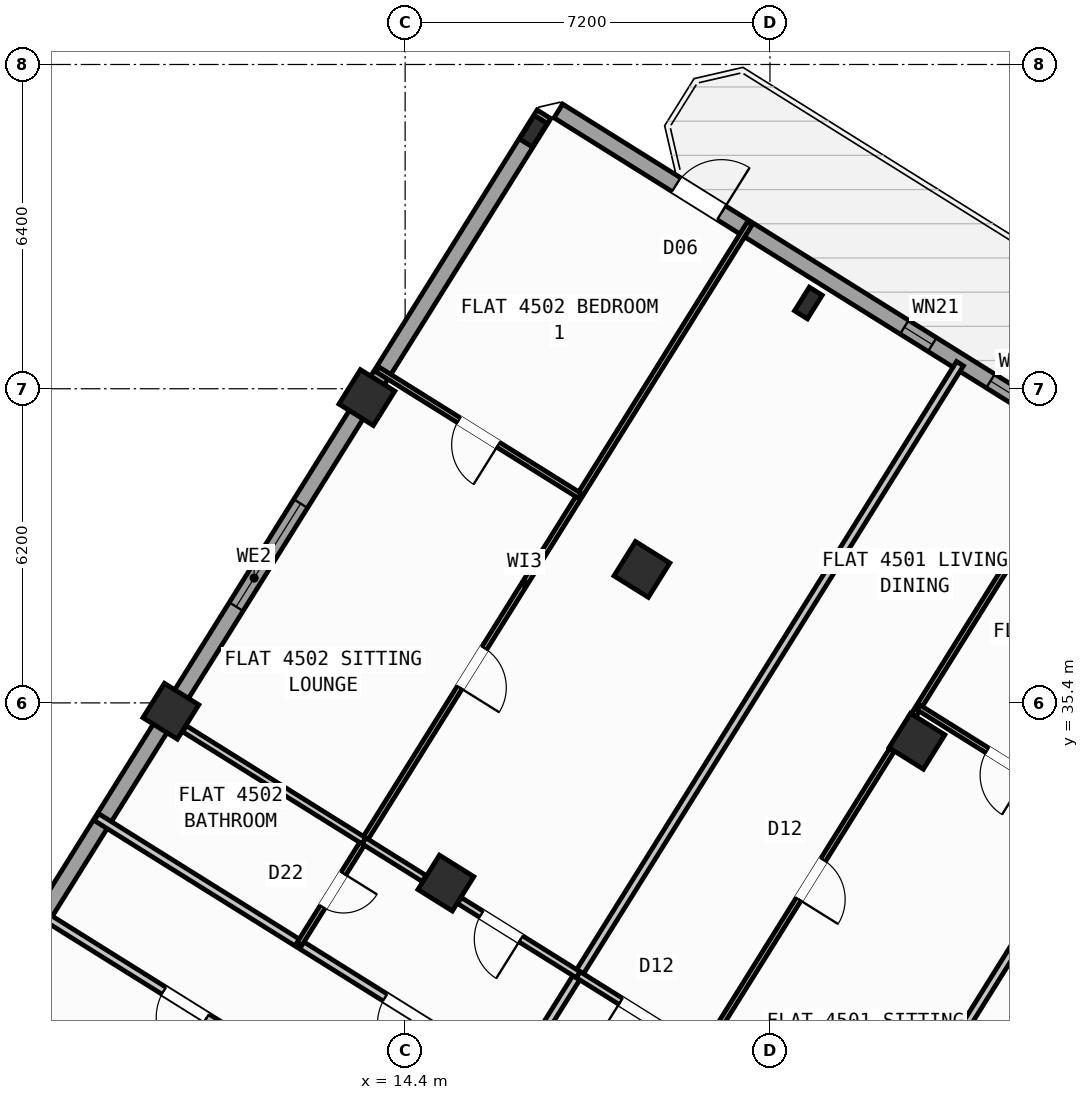
"""IFC4 building model, lengths in metres.
Left out: names, types, materials, properties, quantities, classifications, styles, units other than length and angle.
Written with IfcOpenShell. Run it as: python <this file> out.ifc"""

import sys

from ifc_helpers import new_model, si_unit, direction, frame, frame_2d, origin, origin_2d, place, context, subcontext, project, spatial, rectangle, hollow_rectangle, i_section, extrude, source, transform, mapped, element, fill, save


model = new_model("IFC4")
c1 = context("Model", 3, precision=1e-05, world=origin(), true_north=direction((0.0, 1.0)))
c2 = subcontext(c1, "Body", "Model", "MODEL_VIEW")
j1 = project(units=[si_unit("LENGTHUNIT", "METRE"), si_unit("PLANEANGLEUNIT", "RADIAN")], contexts=[c1])
p1 = place(None, origin())
s1 = spatial("IfcSite", under=j1, at=p1, CompositionType="ELEMENT")
p2 = place(p1, origin())
s2 = spatial("IfcBuilding", under=s1, at=p2, CompositionType="ELEMENT")
p3 = place(p2, frame((0.0, 0.0, 179.4)))
s3 = spatial("IfcBuildingStorey", under=s2, at=p3, CompositionType="ELEMENT", Elevation=179.4)
m1 = source(origin(), c2, "Body", "SweptSolid", [
    extrude(hollow_rectangle(XDim=0.8, YDim=0.8, WallThickness=0.032, at=origin_2d()), origin(), (0.0, 0.0, 1.0), 4.8),
])
p4 = place(p3, frame((24.5, 34.643, 0.0), z_axis=(0.0, 0.0, 1.0), x_axis=(-0.848048096156, 0.529919264233, 0.0)))
e1 = element("IfcColumn", 1, at=p4, inside=s3, PredefinedType="COLUMN", context=c2, shape_type="MappedRepresentation", body=[
    mapped(m1, transform((0.0, 0.0, 0.0), scale=1.0)),
])
m2 = source(origin(), c2, "Body", "SweptSolid", [
    extrude(i_section(OverallWidth=0.3, OverallDepth=0.55, WebThickness=0.015, FlangeThickness=0.029, at=origin_2d()), origin(), (0.0, 0.0, 1.0), 4.8),
])
p5 = place(p3, frame((22.358, 43.292, 0.0), z_axis=(0.0, 0.0, 1.0), x_axis=(-0.848048096156, 0.529919264233, 0.0)))
e2 = element("IfcColumn", 2, at=p5, inside=s3, PredefinedType="COLUMN", context=c2, shape_type="MappedRepresentation", body=[
    mapped(m2, transform((0.0, 0.0, 0.0), scale=1.0)),
])
for number, where, z_axis, x_axis in (
    (3, (19.073, 38.034, 0.0), (0.0, 0.0, 1.0), (-0.848, 0.53, 0.0)),
    (4, (15.205, 31.844, 0.0), (0.0, 0.0, 1.0), (-0.848, 0.53, 0.0)),
):
    element("IfcColumn", number, at=place(p3, frame(where, z_axis=z_axis, x_axis=x_axis)), inside=s3, PredefinedType="COLUMN", context=c2, shape_type="MappedRepresentation", body=[
        mapped(m1, transform((0.0, 0.0, 0.0), scale=1.0)),
    ])
p6 = place(p3, frame((16.931, 46.684, 0.0), z_axis=(0.0, 0.0, 1.0), x_axis=(-0.848048096156, 0.529919264233, 0.0)))
e5 = element("IfcColumn", 5, at=p6, inside=s3, PredefinedType="COLUMN", context=c2, shape_type="MappedRepresentation", body=[
    mapped(m2, transform((0.0, 0.0, 0.0), scale=1.0)),
])
for number, where, z_axis, x_axis in (
    (6, (13.646, 41.426, 0.0), (0.0, 0.0, 1.0), (-0.848, 0.53, 0.0)),
    (7, (9.777, 35.235, 0.0), (0.0, 0.0, 1.0), (-0.848, 0.53, 0.0)),
):
    element("IfcColumn", number, at=place(p3, frame(where, z_axis=z_axis, x_axis=x_axis)), inside=s3, PredefinedType="COLUMN", context=c2, shape_type="MappedRepresentation", body=[
        mapped(m1, transform((0.0, 0.0, 0.0), scale=1.0)),
    ])
p7 = place(p3, frame((5.7, 28.71, 0.0), z_axis=(0.0, 0.0, 1.0), x_axis=(0.529923711467, 0.8480453172, 0.0)))
e8 = element("IfcWall", 8, at=p7, inside=s3, PredefinedType="STANDARD", context=c2, shape_type="SweptSolid", body=[
    extrude(rectangle(XDim=21.587, YDim=0.32, at=frame_2d((10.794, 0.0))), origin(), (0.0, 0.0, 1.0), 4.025),
])
p8 = place(p7, frame((10.127, 0.0, 0.75)))
e9 = element("IfcOpeningElement", 9, at=p8, cuts=e8, PredefinedType="OPENING", context=c2, shape_type="SweptSolid", body=[
    extrude(rectangle(XDim=2.4, YDim=1.6, at=frame_2d((1.2, 0.8))), frame((0.0, 0.17, 0.0), z_axis=(0.0, -1.0, 0.0), x_axis=(1.0, 0.0, 0.0)), (0.0, 0.0, 1.0), 0.34),
])
p9 = place(p3, frame((17.424, 47.083, 0.0), z_axis=(0.0, 0.0, 1.0), x_axis=(0.848049927979, -0.529916332693, 0.0)))
e10 = element("IfcWall", 10, at=p9, inside=s3, PredefinedType="STANDARD", context=c2, shape_type="SweptSolid", body=[
    extrude(rectangle(XDim=29.223, YDim=0.32, at=frame_2d((14.612, 0.0))), origin(), (0.0, 0.0, 1.0), 4.55),
])
p10 = place(p9, frame((2.745, 0.0, 0.0)))
e11 = element("IfcOpeningElement", 11, at=p10, cuts=e10, PredefinedType="OPENING", context=c2, shape_type="SweptSolid", body=[
    extrude(rectangle(XDim=1.05, YDim=2.15, at=frame_2d((0.525, 1.075))), frame((0.0, 0.17, 0.0), z_axis=(0.0, -1.0, 0.0), x_axis=(1.0, 0.0, 0.0)), (0.0, 0.0, 1.0), 0.34),
])
p11 = place(p9, frame((21.926, 0.0, 0.75)))
e12 = element("IfcOpeningElement", 12, at=p11, cuts=e10, PredefinedType="OPENING", context=c2, shape_type="SweptSolid", body=[
    extrude(rectangle(XDim=2.4, YDim=1.6, at=frame_2d((1.2, 0.8))), frame((0.0, 0.17, 0.0), z_axis=(0.0, -1.0, 0.0), x_axis=(1.0, 0.0, 0.0)), (0.0, 0.0, 1.0), 0.34),
])
p12 = place(p9, frame((26.934, 0.0, 0.95)))
e13 = element("IfcOpeningElement", 13, at=p12, cuts=e10, PredefinedType="OPENING", context=c2, shape_type="SweptSolid", body=[
    extrude(rectangle(XDim=1.2, YDim=1.4, at=frame_2d((0.6, 0.7))), frame((0.0, 0.17, 0.0), z_axis=(0.0, -1.0, 0.0), x_axis=(1.0, 0.0, 0.0)), (0.0, 0.0, 1.0), 0.34),
])
p13 = place(p9, frame((10.057, 0.0, 1.0)))
e14 = element("IfcOpeningElement", 14, at=p13, cuts=e10, PredefinedType="OPENING", context=c2, shape_type="SweptSolid", body=[
    extrude(rectangle(XDim=0.65, YDim=1.15, at=frame_2d((0.325, 0.575))), frame((0.0, 0.17, 0.0), z_axis=(0.0, -1.0, 0.0), x_axis=(1.0, 0.0, 0.0)), (0.0, 0.0, 1.0), 0.34),
])
p14 = place(p9, frame((14.636, 0.0, 1.0)))
e15 = element("IfcOpeningElement", 15, at=p14, cuts=e10, PredefinedType="OPENING", context=c2, shape_type="SweptSolid", body=[
    extrude(rectangle(XDim=0.9, YDim=1.25, at=frame_2d((0.45, 0.625))), frame((0.0, 0.17, 0.0), z_axis=(0.0, -1.0, 0.0), x_axis=(1.0, 0.0, 0.0)), (0.0, 0.0, 1.0), 0.34),
])
p15 = place(p9, frame((8.052, 0.0, 1.0)))
e16 = element("IfcOpeningElement", 16, at=p15, cuts=e10, PredefinedType="OPENING", context=c2, shape_type="SweptSolid", body=[
    extrude(rectangle(XDim=0.65, YDim=1.15, at=frame_2d((0.325, 0.575))), frame((0.0, 0.17, 0.0), z_axis=(0.0, -1.0, 0.0), x_axis=(1.0, 0.0, 0.0)), (0.0, 0.0, 1.0), 0.34),
])
p16 = place(p3, frame((31.239, 38.274, 0.0), z_axis=(0.0, 0.0, 1.0), x_axis=(-0.529921796515, -0.848046513806, 0.0)))
e17 = element("IfcWall", 17, at=p16, inside=s3, PredefinedType="PARTITIONING", context=c2, shape_type="SweptSolid", body=[
    extrude(rectangle(XDim=16.5, YDim=0.16, at=frame_2d((8.25, 0.0))), origin(), (0.0, 0.0, 1.0), 4.54),
])
p17 = place(p3, frame((22.495, 24.281, 0.0), z_axis=(0.0, 0.0, 1.0), x_axis=(-0.848052408131, 0.529912363569, 0.0)))
e18 = element("IfcWall", 18, at=p17, inside=s3, PredefinedType="PARTITIONING", context=c2, shape_type="SweptSolid", body=[
    extrude(rectangle(XDim=16.73, YDim=0.16, at=frame_2d((8.365, 0.0))), origin(), (0.0, 0.0, 1.0), 4.54),
])
p18 = place(p17, frame((5.068, 0.0, 0.0)))
e19 = element("IfcOpeningElement", 19, at=p18, cuts=e18, PredefinedType="OPENING", context=c2, shape_type="SweptSolid", body=[
    extrude(rectangle(XDim=1.0, YDim=2.1, at=frame_2d((0.5, 1.05))), frame((0.0, 0.09, 0.0), z_axis=(0.0, -1.0, 0.0), x_axis=(1.0, 0.0, 0.0)), (0.0, 0.0, 1.0), 0.18),
])
p19 = place(p17, frame((9.011, 0.0, 0.0)))
e20 = element("IfcOpeningElement", 20, at=p19, cuts=e18, PredefinedType="OPENING", context=c2, shape_type="SweptSolid", body=[
    extrude(rectangle(XDim=1.0, YDim=2.1, at=frame_2d((0.5, 1.05))), frame((0.0, 0.09, 0.0), z_axis=(0.0, -1.0, 0.0), x_axis=(1.0, 0.0, 0.0)), (0.0, 0.0, 1.0), 0.18),
])
p20 = place(p3, frame((21.329, 22.416, 0.0), z_axis=(0.0, 0.0, 1.0), x_axis=(-0.848052408131, 0.529912363569, 0.0)))
e21 = element("IfcWall", 21, at=p20, inside=s3, PredefinedType="PARTITIONING", context=c2, shape_type="SweptSolid", body=[
    extrude(rectangle(XDim=16.73, YDim=0.16, at=frame_2d((8.365, 0.0))), origin(), (0.0, 0.0, 1.0), 4.54),
])
p21 = place(p20, frame((1.505, 0.0, 0.0)))
e22 = element("IfcOpeningElement", 22, at=p21, cuts=e21, PredefinedType="OPENING", context=c2, shape_type="SweptSolid", body=[
    extrude(rectangle(XDim=1.0, YDim=2.1, at=frame_2d((0.5, 1.05))), frame((0.0, 0.09, 0.0), z_axis=(0.0, -1.0, 0.0), x_axis=(1.0, 0.0, 0.0)), (0.0, 0.0, 1.0), 0.18),
])
p22 = place(p20, frame((6.435, 0.0, 0.0)))
e23 = element("IfcOpeningElement", 23, at=p22, cuts=e21, PredefinedType="OPENING", context=c2, shape_type="SweptSolid", body=[
    extrude(rectangle(XDim=1.0, YDim=2.1, at=frame_2d((0.5, 1.05))), frame((0.0, 0.09, 0.0), z_axis=(0.0, -1.0, 0.0), x_axis=(1.0, 0.0, 0.0)), (0.0, 0.0, 1.0), 0.18),
])
p23 = place(p20, frame((12.784, 0.0, 0.0)))
e24 = element("IfcOpeningElement", 24, at=p23, cuts=e21, PredefinedType="OPENING", context=c2, shape_type="SweptSolid", body=[
    extrude(rectangle(XDim=1.0, YDim=2.1, at=frame_2d((0.5, 1.05))), frame((0.0, 0.09, 0.0), z_axis=(0.0, -1.0, 0.0), x_axis=(1.0, 0.0, 0.0)), (0.0, 0.0, 1.0), 0.18),
])
p24 = place(p3, frame((25.351, 42.095, 0.0), z_axis=(0.0, 0.0, 1.0), x_axis=(-0.529926315456, -0.848043690023, 0.0)))
e25 = element("IfcWall", 25, at=p24, inside=s3, PredefinedType="PARTITIONING", context=c2, shape_type="SweptSolid", body=[
    extrude(rectangle(XDim=16.62, YDim=0.16, at=frame_2d((8.31, 0.0))), origin(), (0.0, 0.0, 1.0), 4.54),
])
p25 = place(p3, frame((27.889, 40.685, 0.0), z_axis=(0.0, 0.0, 1.0), x_axis=(-0.529924752708, -0.848044666552, 0.0)))
e26 = element("IfcWall", 26, at=p25, inside=s3, PredefinedType="PARTITIONING", context=c2, shape_type="SweptSolid", body=[
    extrude(rectangle(XDim=6.508, YDim=0.11, at=frame_2d((3.254, 0.0))), origin(), (0.0, 0.0, 1.0), 4.54),
])
p26 = place(p3, frame((24.004, 34.467, 0.0), z_axis=(0.0, 0.0, 1.0), x_axis=(-0.529907440938, -0.848055484057, 0.0)))
e27 = element("IfcWall", 27, at=p26, inside=s3, PredefinedType="PARTITIONING", context=c2, shape_type="SweptSolid", body=[
    extrude(rectangle(XDim=6.476, YDim=0.11, at=frame_2d((3.238, 0.0))), origin(), (0.0, 0.0, 1.0), 4.54),
])
p27 = place(p26, frame((2.552, 0.0, 0.0)))
e28 = element("IfcOpeningElement", 28, at=p27, cuts=e27, PredefinedType="OPENING", context=c2, shape_type="SweptSolid", body=[
    extrude(rectangle(XDim=0.92, YDim=2.08, at=frame_2d((0.46, 1.04))), frame((0.0, 0.065, 0.0), z_axis=(0.0, -1.0, 0.0), x_axis=(1.0, 0.0, 0.0)), (0.0, 0.0, 1.0), 0.13),
])
p28 = place(p3, frame((20.203, 28.543, 0.0), z_axis=(0.0, 0.0, 1.0), x_axis=(-0.848066485351, 0.529889834233, 0.0)))
e29 = element("IfcWall", 29, at=p28, inside=s3, PredefinedType="PLUMBINGWALL", context=c2, shape_type="SweptSolid", body=[
    extrude(rectangle(XDim=2.816, YDim=0.14, at=frame_2d((1.408, 0.0))), origin(), (0.0, 0.0, 1.0), 4.025),
])
p29 = place(p28, frame((0.906, 0.0, 0.0)))
e30 = element("IfcOpeningElement", 30, at=p29, cuts=e29, PredefinedType="OPENING", context=c2, shape_type="SweptSolid", body=[
    extrude(rectangle(XDim=0.92, YDim=2.08, at=frame_2d((0.46, 1.04))), frame((0.0, 0.08, 0.0), z_axis=(0.0, -1.0, 0.0), x_axis=(1.0, 0.0, 0.0)), (0.0, 0.0, 1.0), 0.16),
])
p30 = place(p3, frame((28.023, 33.129, 0.0), z_axis=(0.0, 0.0, 1.0), x_axis=(-0.848051592054, 0.529913669587, 0.0)))
e31 = element("IfcWall", 31, at=p30, inside=s3, PredefinedType="PARTITIONING", context=c2, shape_type="SweptSolid", body=[
    extrude(rectangle(XDim=4.118, YDim=0.11, at=frame_2d((2.059, 0.0))), origin(), (0.0, 0.0, 1.0), 4.54),
])
p31 = place(p30, frame((1.599, 0.0, 0.0)))
e32 = element("IfcOpeningElement", 32, at=p31, cuts=e31, PredefinedType="OPENING", context=c2, shape_type="SweptSolid", body=[
    extrude(rectangle(XDim=0.92, YDim=2.08, at=frame_2d((0.46, 1.04))), frame((0.0, 0.065, 0.0), z_axis=(0.0, -1.0, 0.0), x_axis=(1.0, 0.0, 0.0)), (0.0, 0.0, 1.0), 0.13),
])
p32 = place(p3, frame((21.202, 44.864, 0.0), z_axis=(0.0, 0.0, 1.0), x_axis=(-0.529920421309, -0.848047373134, 0.0)))
e33 = element("IfcWall", 33, at=p32, inside=s3, PredefinedType="PARTITIONING", context=c2, shape_type="SweptSolid", body=[
    extrude(rectangle(XDim=16.77, YDim=0.11, at=frame_2d((8.385, 0.0))), origin(), (0.0, 0.0, 1.0), 4.54),
])
p33 = place(p32, frame((15.13, 0.0, 0.0)))
e34 = element("IfcOpeningElement", 34, at=p33, cuts=e33, PredefinedType="OPENING", context=c2, shape_type="SweptSolid", body=[
    extrude(rectangle(XDim=0.78, YDim=2.05, at=frame_2d((0.39, 1.025))), frame((0.0, 0.065, 0.0), z_axis=(0.0, -1.0, 0.0), x_axis=(1.0, 0.0, 0.0)), (0.0, 0.0, 1.0), 0.13),
])
p34 = place(p32, frame((9.884, 0.0, 0.0)))
e35 = element("IfcOpeningElement", 35, at=p34, cuts=e33, PredefinedType="OPENING", context=c2, shape_type="SweptSolid", body=[
    extrude(rectangle(XDim=0.92, YDim=2.08, at=frame_2d((0.46, 1.04))), frame((0.0, 0.065, 0.0), z_axis=(0.0, -1.0, 0.0), x_axis=(1.0, 0.0, 0.0)), (0.0, 0.0, 1.0), 0.13),
])
p35 = place(p3, frame((17.815, 30.035, 0.0), z_axis=(0.0, 0.0, 1.0), x_axis=(-0.848033088468, 0.529943280798, 0.0)))
e36 = element("IfcWall", 36, at=p35, inside=s3, PredefinedType="PLUMBINGWALL", context=c2, shape_type="SweptSolid", body=[
    extrude(rectangle(XDim=2.76, YDim=0.14, at=frame_2d((1.38, 0.0))), origin(), (0.0, 0.0, 1.0), 4.025),
])
p36 = place(p35, frame((1.333, 0.0, 0.0)))
e37 = element("IfcOpeningElement", 37, at=p36, cuts=e36, PredefinedType="OPENING", context=c2, shape_type="SweptSolid", body=[
    extrude(rectangle(XDim=0.92, YDim=2.08, at=frame_2d((0.46, 1.04))), frame((0.0, 0.08, 0.0), z_axis=(0.0, -1.0, 0.0), x_axis=(1.0, 0.0, 0.0)), (0.0, 0.0, 1.0), 0.16),
])
p37 = place(p3, frame((14.776, 31.935, 0.0), z_axis=(0.0, 0.0, 1.0), x_axis=(-0.847978739052, 0.530030242643, 0.0)))
e38 = element("IfcWall", 38, at=p37, inside=s3, PredefinedType="PLUMBINGWALL", context=c2, shape_type="SweptSolid", body=[
    extrude(rectangle(XDim=1.402, YDim=0.14, at=frame_2d((0.701, 0.0))), origin(), (0.0, 0.0, 1.0), 4.025),
])
p38 = place(p3, frame((13.587, 32.678, 0.0), z_axis=(0.0, 0.0, 1.0), x_axis=(-0.848073874788, 0.529878007566, 0.0)))
e39 = element("IfcWall", 39, at=p38, inside=s3, PredefinedType="PLUMBINGWALL", context=c2, shape_type="SweptSolid", body=[
    extrude(rectangle(XDim=4.174, YDim=0.14, at=frame_2d((2.087, 0.0))), origin(), (0.0, 0.0, 1.0), 4.025),
])
p39 = place(p3, frame((17.844, 39.49, 0.0), z_axis=(0.0, 0.0, 1.0), x_axis=(-0.848042018142, 0.529928990966, 0.0)))
e40 = element("IfcWall", 40, at=p39, inside=s3, PredefinedType="PARTITIONING", context=c2, shape_type="SweptSolid", body=[
    extrude(rectangle(XDim=4.706, YDim=0.11, at=frame_2d((2.353, 0.0))), origin(), (0.0, 0.0, 1.0), 4.54),
])
p40 = place(p39, frame((1.893, 0.0, 0.0)))
e41 = element("IfcOpeningElement", 41, at=p40, cuts=e40, PredefinedType="OPENING", context=c2, shape_type="SweptSolid", body=[
    extrude(rectangle(XDim=0.92, YDim=2.08, at=frame_2d((0.46, 1.04))), frame((0.0, 0.065, 0.0), z_axis=(0.0, -1.0, 0.0), x_axis=(1.0, 0.0, 0.0)), (0.0, 0.0, 1.0), 0.13),
])
m3 = source(origin(), c2, "Body", "SweptSolid", [
    extrude(rectangle(XDim=1.05, YDim=2.15, at=frame_2d((0.525, 1.075))), frame((0.0, 0.025, 0.0), z_axis=(0.0, -1.0, 0.0), x_axis=(1.0, 0.0, 0.0)), (0.0, 0.0, 1.0), 0.05),
])
p41 = place(p10, origin())
e42 = element("IfcDoor", 42, at=p41, inside=s3, OperationType="SINGLE_SWING_RIGHT", PredefinedType="DOOR", context=c2, shape_type="MappedRepresentation", body=[
    mapped(m3, transform((0.0, 0.0, 0.0), scale=1.0)),
])
fill(e11, e42)
m4 = source(origin(), c2, "Body", "SweptSolid", [
    extrude(rectangle(XDim=2.4, YDim=1.6, at=frame_2d((1.2, 0.8))), frame((0.0, 0.03, 0.0), z_axis=(0.0, -1.0, 0.0), x_axis=(1.0, 0.0, 0.0)), (0.0, 0.0, 1.0), 0.06),
])
p42 = place(p8, origin())
e43 = element("IfcWindow", 43, at=p42, inside=s3, PartitioningType="SINGLE_PANEL", PredefinedType="WINDOW", context=c2, shape_type="MappedRepresentation", body=[
    mapped(m4, transform((0.0, 0.0, 0.0), scale=1.0)),
])
fill(e9, e43)
m5 = source(origin(), c2, "Body", "SweptSolid", [
    extrude(rectangle(XDim=0.65, YDim=1.15, at=frame_2d((0.325, 0.575))), frame((0.0, 0.03, 0.0), z_axis=(0.0, -1.0, 0.0), x_axis=(1.0, 0.0, 0.0)), (0.0, 0.0, 1.0), 0.06),
])
p43 = place(p13, origin())
e44 = element("IfcWindow", 44, at=p43, inside=s3, PartitioningType="SINGLE_PANEL", PredefinedType="WINDOW", context=c2, shape_type="MappedRepresentation", body=[
    mapped(m5, transform((0.0, 0.0, 0.0), scale=1.0)),
])
fill(e14, e44)
p44 = place(p15, origin())
e45 = element("IfcWindow", 45, at=p44, inside=s3, PartitioningType="SINGLE_PANEL", PredefinedType="WINDOW", context=c2, shape_type="MappedRepresentation", body=[
    mapped(m5, transform((0.0, 0.0, 0.0), scale=1.0)),
])
fill(e16, e45)
m6 = source(origin(), c2, "Body", "SweptSolid", [
    extrude(rectangle(XDim=1.0, YDim=2.1, at=frame_2d((0.5, 1.05))), frame((0.0, 0.025, 0.0), z_axis=(0.0, -1.0, 0.0), x_axis=(1.0, 0.0, 0.0)), (0.0, 0.0, 1.0), 0.05),
])
p45 = place(p23, origin())
e46 = element("IfcDoor", 46, at=p45, inside=s3, OperationType="SINGLE_SWING_LEFT", PredefinedType="DOOR", context=c2, shape_type="MappedRepresentation", body=[
    mapped(m6, transform((0.0, 0.0, 0.0), scale=1.0)),
])
fill(e24, e46)
m7 = source(origin(), c2, "Body", "SweptSolid", [
    extrude(rectangle(XDim=0.92, YDim=2.08, at=frame_2d((0.46, 1.04))), frame((0.0, 0.025, 0.0), z_axis=(0.0, -1.0, 0.0), x_axis=(1.0, 0.0, 0.0)), (0.0, 0.0, 1.0), 0.05),
])
p46 = place(p29, origin())
e47 = element("IfcDoor", 47, at=p46, inside=s3, OperationType="SINGLE_SWING_RIGHT", PredefinedType="DOOR", context=c2, shape_type="MappedRepresentation", body=[
    mapped(m7, transform((0.0, 0.0, 0.0), scale=1.0)),
])
fill(e30, e47)
p47 = place(p27, origin())
e48 = element("IfcDoor", 48, at=p47, inside=s3, OperationType="SINGLE_SWING_RIGHT", PredefinedType="DOOR", context=c2, shape_type="MappedRepresentation", body=[
    mapped(m7, transform((0.0, 0.0, 0.0), scale=1.0)),
])
fill(e28, e48)
p48 = place(p31, origin())
e49 = element("IfcDoor", 49, at=p48, inside=s3, OperationType="SINGLE_SWING_LEFT", PredefinedType="DOOR", context=c2, shape_type="MappedRepresentation", body=[
    mapped(m7, transform((0.0, 0.0, 0.0), scale=1.0)),
])
fill(e32, e49)
p49 = place(p19, origin())
e50 = element("IfcDoor", 50, at=p49, inside=s3, OperationType="SINGLE_SWING_LEFT", PredefinedType="DOOR", context=c2, shape_type="MappedRepresentation", body=[
    mapped(m6, transform((0.0, 0.0, 0.0), scale=1.0)),
])
fill(e20, e50)
p50 = place(p36, origin())
e51 = element("IfcDoor", 51, at=p50, inside=s3, OperationType="SINGLE_SWING_LEFT", PredefinedType="DOOR", context=c2, shape_type="MappedRepresentation", body=[
    mapped(m7, transform((0.0, 0.0, 0.0), scale=1.0)),
])
fill(e37, e51)
m8 = source(origin(), c2, "Body", "SweptSolid", [
    extrude(rectangle(XDim=0.78, YDim=2.05, at=frame_2d((0.39, 1.025))), frame((0.0, 0.025, 0.0), z_axis=(0.0, -1.0, 0.0), x_axis=(1.0, 0.0, 0.0)), (0.0, 0.0, 1.0), 0.05),
])
p51 = place(p33, origin())
e52 = element("IfcDoor", 52, at=p51, inside=s3, OperationType="SINGLE_SWING_LEFT", PredefinedType="DOOR", context=c2, shape_type="MappedRepresentation", body=[
    mapped(m8, transform((0.0, 0.0, 0.0), scale=1.0)),
])
fill(e34, e52)
p52 = place(p34, origin())
e53 = element("IfcDoor", 53, at=p52, inside=s3, OperationType="SINGLE_SWING_RIGHT", PredefinedType="DOOR", context=c2, shape_type="MappedRepresentation", body=[
    mapped(m7, transform((0.0, 0.0, 0.0), scale=1.0)),
])
fill(e35, e53)
p53 = place(p40, origin())
e54 = element("IfcDoor", 54, at=p53, inside=s3, OperationType="SINGLE_SWING_LEFT", PredefinedType="DOOR", context=c2, shape_type="MappedRepresentation", body=[
    mapped(m7, transform((0.0, 0.0, 0.0), scale=1.0)),
])
fill(e41, e54)
save(model, sys.argv[1])
